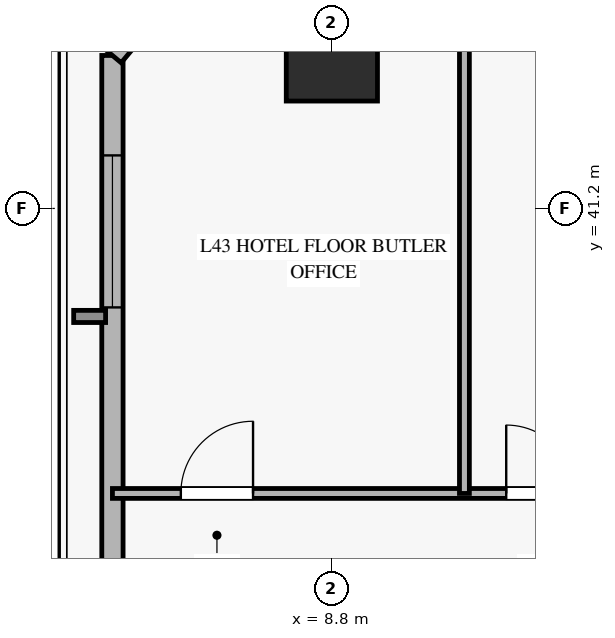
"""IFC4 building model, lengths in metres.
Left out: names, types, materials, properties, quantities, classifications, styles, units other than length and angle.
Written with IfcOpenShell. Run it as: python <this file> out.ifc"""

import sys

from ifc_helpers import new_model, si_unit, direction, frame, frame_2d, origin, origin_2d, place, context, subcontext, project, spatial, rectangle, hollow_rectangle, extrude, source, transform, mapped, element, fill, save


model = new_model("IFC4")
c1 = context("Model", 3, precision=1e-05, world=origin(), true_north=direction((0.0, 1.0)))
c2 = subcontext(c1, "Body", "Model", "MODEL_VIEW")
j1 = project(units=[si_unit("LENGTHUNIT", "METRE"), si_unit("PLANEANGLEUNIT", "RADIAN")], contexts=[c1])
p1 = place(None, origin())
s1 = spatial("IfcSite", under=j1, at=p1, CompositionType="ELEMENT")
p2 = place(p1, origin())
s2 = spatial("IfcBuilding", under=s1, at=p2, CompositionType="ELEMENT")
p3 = place(p2, frame((0.0, 0.0, 173.7)))
s3 = spatial("IfcBuildingStorey", under=s2, at=p3, CompositionType="ELEMENT", Elevation=173.7)
m1 = source(origin(), c2, "Body", "SweptSolid", [
    extrude(hollow_rectangle(XDim=1.2, YDim=1.2, WallThickness=0.055, at=origin_2d()), origin(), (0.0, 0.0, 1.0), 3.27),
])
p4 = place(p3, frame((8.806, 43.213, 0.0), z_axis=(0.0, 0.0, 1.0), x_axis=(1.0, 0.0, 0.0)))
e1 = element("IfcColumn", 1, at=p4, inside=s3, PredefinedType="COLUMN", context=c2, shape_type="MappedRepresentation", body=[
    mapped(m1, transform((0.0, 0.0, 0.0), x_axis=(1.0, 0.0, 0.0), y_axis=(0.0, 1.0, 0.0), z_axis=(0.0, 0.0, 1.0), scale=1.0)),
])
p5 = place(p3, frame((5.919, 28.213, 0.0), z_axis=(0.0, 0.0, 1.0), x_axis=(0.0, 1.0, 0.0)))
e2 = element("IfcWall", 2, at=p5, inside=s3, PredefinedType="SOLIDWALL", context=c2, shape_type="SweptSolid", body=[
    extrude(rectangle(XDim=15.0, YDim=0.28, at=frame_2d((7.5, 0.0))), origin(), (0.0, 0.0, 1.0), 2.75),
])
p6 = place(p5, frame((1.271, 0.0, 0.45)))
e3 = element("IfcOpeningElement", 3, at=p6, cuts=e2, PredefinedType="OPENING", context=c2, shape_type="SweptSolid", body=[
    extrude(rectangle(XDim=2.0, YDim=2.0, at=frame_2d((1.0, 1.0))), frame((0.0, 0.15, 0.0), z_axis=(0.0, -1.0, 0.0), x_axis=(1.0, 0.0, 0.0)), (0.0, 0.0, 1.0), 0.3),
])
p7 = place(p5, frame((11.685, 0.0, 0.45)))
e4 = element("IfcOpeningElement", 4, at=p7, cuts=e2, PredefinedType="OPENING", context=c2, shape_type="SweptSolid", body=[
    extrude(rectangle(XDim=2.0, YDim=2.0, at=frame_2d((1.0, 1.0))), frame((0.0, 0.15, 0.0), z_axis=(0.0, -1.0, 0.0), x_axis=(1.0, 0.0, 0.0)), (0.0, 0.0, 1.0), 0.3),
])
p8 = place(p3, frame((8.456, 46.25, 0.0), z_axis=(0.0, 0.0, 1.0), x_axis=(-0.641106288565, -0.76745210063, 0.0)))
e5 = element("IfcWall", 5, at=p8, inside=s3, PredefinedType="SOLIDWALL", context=c2, shape_type="SweptSolid", body=[
    extrude(rectangle(XDim=3.957, YDim=0.3, at=frame_2d((1.979, 0.0))), origin(), (0.0, 0.0, 1.0), 2.75),
])
p9 = place(p8, frame((1.179, 0.0, 0.45)))
e6 = element("IfcOpeningElement", 6, at=p9, cuts=e5, PredefinedType="OPENING", context=c2, shape_type="SweptSolid", body=[
    extrude(rectangle(XDim=1.6, YDim=2.0, at=frame_2d((0.8, 1.0))), frame((0.0, 0.16, 0.0), z_axis=(0.0, -1.0, 0.0), x_axis=(1.0, 0.0, 0.0)), (0.0, 0.0, 1.0), 0.32),
])
p10 = place(p3, frame((5.919, 37.45, 0.0), z_axis=(0.0, 0.0, 1.0), x_axis=(1.0, 0.0, 0.0)))
e7 = element("IfcWall", 7, at=p10, inside=s3, PredefinedType="PARTITIONING", context=c2, shape_type="SweptSolid", body=[
    extrude(rectangle(XDim=13.331, YDim=0.13, at=frame_2d((6.666, 0.0))), origin(), (0.0, 0.0, 1.0), 2.755),
])
p11 = place(p10, frame((0.9, 0.0, 0.0)))
e8 = element("IfcOpeningElement", 8, at=p11, cuts=e7, PredefinedType="OPENING", context=c2, shape_type="SweptSolid", body=[
    extrude(rectangle(XDim=0.95, YDim=2.1, at=frame_2d((0.475, 1.05))), frame((0.0, 0.075, 0.0), z_axis=(0.0, -1.0, 0.0), x_axis=(1.0, 0.0, 0.0)), (0.0, 0.0, 1.0), 0.15),
])
p12 = place(p10, frame((5.181, 0.0, 0.0)))
e9 = element("IfcOpeningElement", 9, at=p12, cuts=e7, PredefinedType="OPENING", context=c2, shape_type="SweptSolid", body=[
    extrude(rectangle(XDim=0.9, YDim=2.1, at=frame_2d((0.45, 1.05))), frame((0.0, 0.075, 0.0), z_axis=(0.0, -1.0, 0.0), x_axis=(1.0, 0.0, 0.0)), (0.0, 0.0, 1.0), 0.15),
])
p13 = place(p3, frame((10.55, 37.45, 0.0), z_axis=(0.0, 0.0, 1.0), x_axis=(0.0, 1.0, 0.0)))
e10 = element("IfcWall", 10, at=p13, inside=s3, PredefinedType="PARTITIONING", context=c2, shape_type="SweptSolid", body=[
    extrude(rectangle(XDim=8.8, YDim=0.13, at=frame_2d((4.4, 0.0))), origin(), (0.0, 0.0, 1.0), 3.27),
])
m2 = source(origin(), c2, "Body", "SweptSolid", [
    extrude(rectangle(XDim=2.0, YDim=2.0, at=frame_2d((1.0, 1.0))), frame((0.0, 0.03, 0.0), z_axis=(0.0, -1.0, 0.0), x_axis=(1.0, 0.0, 0.0)), (0.0, 0.0, 1.0), 0.06),
])
p14 = place(p7, origin())
e11 = element("IfcWindow", 11, at=p14, inside=s3, PartitioningType="SINGLE_PANEL", PredefinedType="WINDOW", context=c2, shape_type="MappedRepresentation", body=[
    mapped(m2, transform((0.0, 0.0, 0.0), x_axis=(1.0, 0.0, 0.0), y_axis=(0.0, 1.0, 0.0), z_axis=(0.0, 0.0, 1.0), scale=1.0)),
])
fill(e4, e11)
m3 = source(origin(), c2, "Body", "SweptSolid", [
    extrude(rectangle(XDim=0.95, YDim=2.1, at=frame_2d((0.475, 1.05))), frame((0.0, 0.025, 0.0), z_axis=(0.0, -1.0, 0.0), x_axis=(1.0, 0.0, 0.0)), (0.0, 0.0, 1.0), 0.05),
])
p15 = place(p11, origin())
e12 = element("IfcDoor", 12, at=p15, inside=s3, OperationType="SINGLE_SWING_RIGHT", PredefinedType="DOOR", context=c2, shape_type="MappedRepresentation", body=[
    mapped(m3, transform((0.0, 0.0, 0.0), x_axis=(1.0, 0.0, 0.0), y_axis=(0.0, 1.0, 0.0), z_axis=(0.0, 0.0, 1.0), scale=1.0)),
])
fill(e8, e12)
m4 = source(origin(), c2, "Body", "SweptSolid", [
    extrude(rectangle(XDim=0.9, YDim=2.1, at=frame_2d((0.45, 1.05))), frame((0.0, 0.025, 0.0), z_axis=(0.0, -1.0, 0.0), x_axis=(1.0, 0.0, 0.0)), (0.0, 0.0, 1.0), 0.05),
])
p16 = place(p12, origin())
e13 = element("IfcDoor", 13, at=p16, inside=s3, OperationType="SINGLE_SWING_LEFT", PredefinedType="DOOR", context=c2, shape_type="MappedRepresentation", body=[
    mapped(m4, transform((0.0, 0.0, 0.0), x_axis=(1.0, 0.0, 0.0), y_axis=(0.0, 1.0, 0.0), z_axis=(0.0, 0.0, 1.0), scale=1.0)),
])
fill(e9, e13)
save(model, sys.argv[1])
